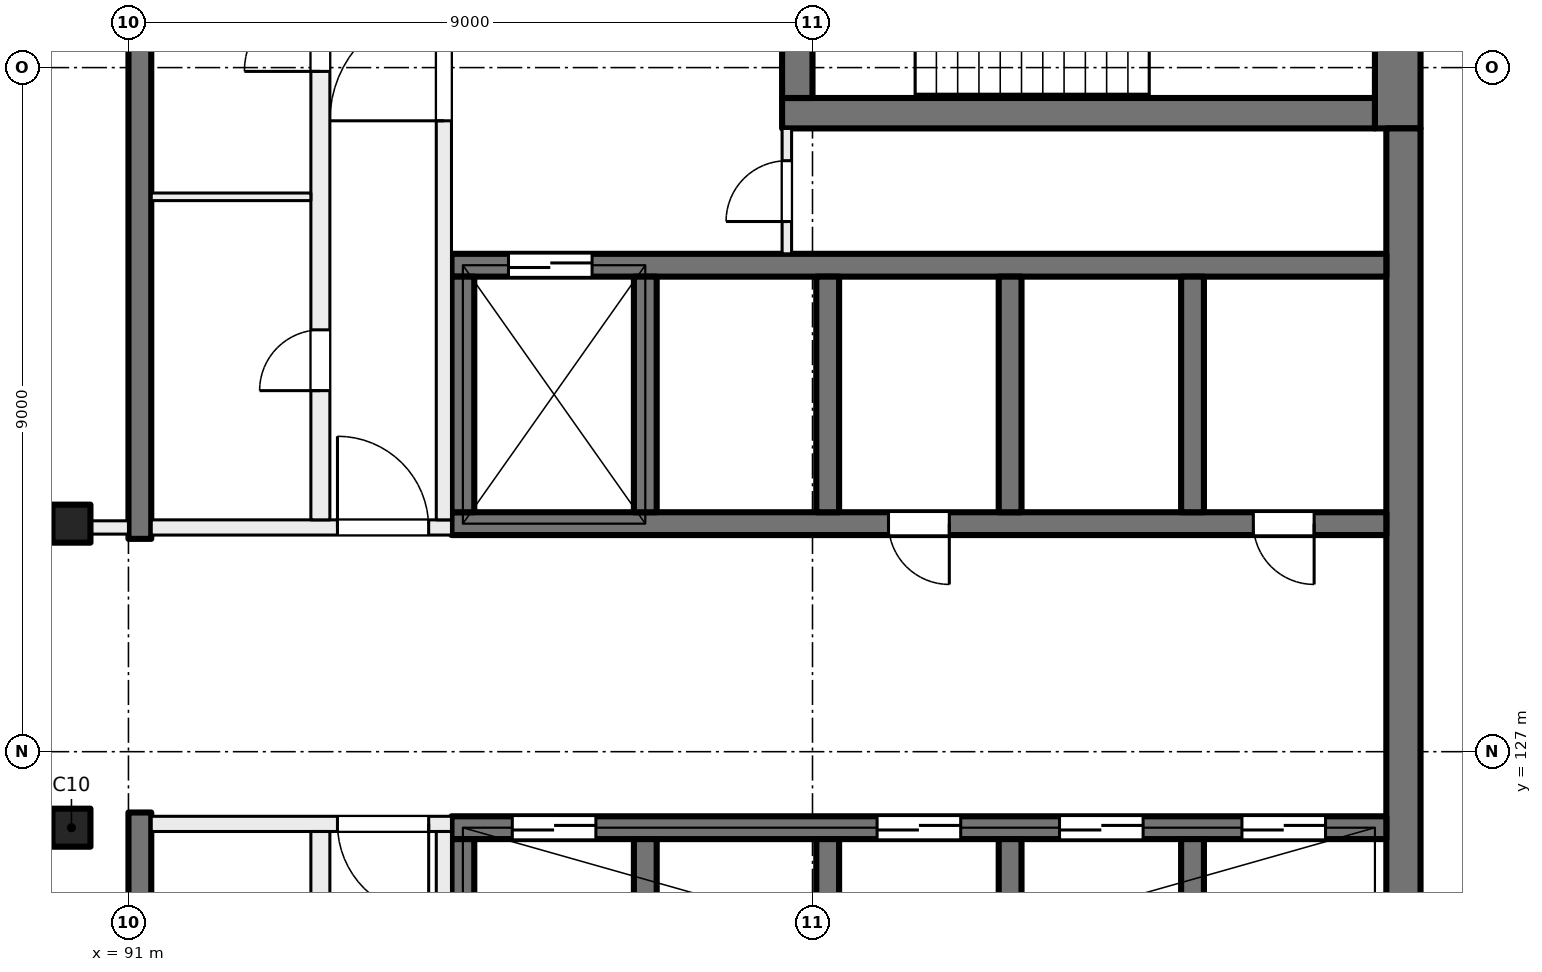
"""IFC4 building model, lengths in metres.
Left out: names, types, materials, properties, quantities, classifications, styles, units other than length and angle.
Written with IfcOpenShell. Run it as: python <this file> out.ifc"""

import sys

from ifc_helpers import new_model, si_unit, direction, frame, frame_2d, origin, origin_2d, place, context, subcontext, project, spatial, rectangle, extrude, element, fill, save


model = new_model("IFC4")
c1 = context("Model", 3, precision=1e-05, world=origin(), true_north=direction((0.0, 1.0)))
c2 = subcontext(c1, "Body", "Model", "MODEL_VIEW")
j1 = project(units=[si_unit("LENGTHUNIT", "METRE"), si_unit("PLANEANGLEUNIT", "RADIAN")], contexts=[c1])
p1 = place(None, origin())
s1 = spatial("IfcSite", under=j1, at=p1, CompositionType="ELEMENT")
p2 = place(p1, origin())
s2 = spatial("IfcBuilding", under=s1, at=p2, CompositionType="ELEMENT")
p3 = place(p2, frame((0.0, 0.0, 265.5)))
s3 = spatial("IfcBuildingStorey", under=s2, at=p3, CompositionType="ELEMENT", Elevation=265.5)
for number, where, z_axis, x_axis in (
    (1, (90.25, 130.0, 0.0), (0.0, 0.0, 1.0), (1.0, 0.0, 0.0)),
    (2, (90.25, 126.0, 0.0), (0.0, 0.0, 1.0), (1.0, 0.0, 0.0)),
):
    element("IfcColumn", number, at=place(p3, frame(where, z_axis=z_axis, x_axis=x_axis)), inside=s3, PredefinedType="COLUMN", context=c2, shape_type="SweptSolid", body=[
        extrude(rectangle(XDim=0.5, YDim=0.5, at=origin_2d()), origin(), (0.0, 0.0, 1.0), 4.0),
    ])
p4 = place(p3, frame((107.7, 139.0, 0.0), z_axis=(0.0, 0.0, 1.0), x_axis=(0.0, -1.0, 0.0)))
e3 = element("IfcWall", 3, at=p4, inside=s3, PredefinedType="SHEAR", context=c2, shape_type="SweptSolid", body=[
    extrude(rectangle(XDim=3.8, YDim=0.6, at=frame_2d((1.9, 0.0))), origin(), (0.0, 0.0, 1.0), 4.0),
])
p5 = place(p3, frame((107.775, 135.2, 0.0), z_axis=(0.0, 0.0, 1.0), x_axis=(0.0, -1.0, 0.0)))
e4 = element("IfcWall", 4, at=p5, inside=s3, PredefinedType="SHEAR", context=c2, shape_type="SweptSolid", body=[
    extrude(rectangle(XDim=14.4, YDim=0.45, at=frame_2d((7.2, 0.0))), origin(), (0.0, 0.0, 1.0), 4.0),
])
p6 = place(p3, frame((107.4, 135.4, 0.0), z_axis=(0.0, 0.0, 1.0), x_axis=(-1.0, 0.0, 0.0)))
e5 = element("IfcWall", 5, at=p6, inside=s3, PredefinedType="SHEAR", context=c2, shape_type="SweptSolid", body=[
    extrude(rectangle(XDim=7.8, YDim=0.4, at=frame_2d((3.9, 0.0))), origin(), (0.0, 0.0, 1.0), 4.0),
])
p7 = place(p3, frame((99.8, 138.4, 0.0), z_axis=(0.0, 0.0, 1.0), x_axis=(0.0, -1.0, 0.0)))
e6 = element("IfcWall", 6, at=p7, inside=s3, PredefinedType="SHEAR", context=c2, shape_type="SweptSolid", body=[
    extrude(rectangle(XDim=2.8, YDim=0.4, at=frame_2d((1.4, 0.0))), origin(), (0.0, 0.0, 1.0), 4.0),
])
p8 = place(p7, frame((0.825, 0.0, 0.0)))
e7 = element("IfcOpeningElement", 7, at=p8, cuts=e6, PredefinedType="OPENING", context=c2, shape_type="SweptSolid", body=[
    extrude(rectangle(XDim=1.0, YDim=2.1, at=frame_2d((0.5, 1.05))), frame((0.0, 0.21, 0.0), z_axis=(0.0, -1.0, 0.0), x_axis=(1.0, 0.0, 0.0)), (0.0, 0.0, 1.0), 0.42),
])
p9 = place(p3, frame((107.55, 130.0, 0.0), z_axis=(0.0, 0.0, 1.0), x_axis=(-1.0, 0.0, 0.0)))
e8 = element("IfcWall", 8, at=p9, inside=s3, PredefinedType="SHEAR", context=c2, shape_type="SweptSolid", body=[
    extrude(rectangle(XDim=12.3, YDim=0.3, at=frame_2d((6.15, 0.0))), origin(), (0.0, 0.0, 1.0), 4.0),
])
p10 = place(p9, frame((0.95, 0.0, 0.0)))
e9 = element("IfcOpeningElement", 9, at=p10, cuts=e8, PredefinedType="OPENING", context=c2, shape_type="SweptSolid", body=[
    extrude(rectangle(XDim=0.8, YDim=2.1, at=frame_2d((0.4, 1.05))), frame((0.0, 0.16, 0.0), z_axis=(0.0, -1.0, 0.0), x_axis=(1.0, 0.0, 0.0)), (0.0, 0.0, 1.0), 0.32),
])
p11 = place(p9, frame((5.75, 0.0, 0.0)))
e10 = element("IfcOpeningElement", 10, at=p11, cuts=e8, PredefinedType="OPENING", context=c2, shape_type="SweptSolid", body=[
    extrude(rectangle(XDim=0.8, YDim=2.1, at=frame_2d((0.4, 1.05))), frame((0.0, 0.16, 0.0), z_axis=(0.0, -1.0, 0.0), x_axis=(1.0, 0.0, 0.0)), (0.0, 0.0, 1.0), 0.32),
])
p12 = place(p3, frame((107.55, 133.4, 0.0), z_axis=(0.0, 0.0, 1.0), x_axis=(-1.0, 0.0, 0.0)))
e11 = element("IfcWall", 11, at=p12, inside=s3, PredefinedType="SHEAR", context=c2, shape_type="SweptSolid", body=[
    extrude(rectangle(XDim=12.3, YDim=0.3, at=frame_2d((6.15, 0.0))), origin(), (0.0, 0.0, 1.0), 4.0),
])
p13 = place(p12, frame((10.45, 0.0, 0.0)))
e12 = element("IfcOpeningElement", 12, at=p13, cuts=e11, PredefinedType="OPENING", context=c2, shape_type="SweptSolid", body=[
    extrude(rectangle(XDim=1.1, YDim=2.1, at=frame_2d((0.55, 1.05))), frame((0.0, 0.16, 0.0), z_axis=(0.0, -1.0, 0.0), x_axis=(1.0, 0.0, 0.0)), (0.0, 0.0, 1.0), 0.32),
])
for number, where, z_axis, x_axis in (
    (13, (105.0, 133.25, 0.0), (0.0, 0.0, 1.0), (0.0, -1.0, 0.0)),
    (14, (102.6, 133.25, 0.0), (0.0, 0.0, 1.0), (0.0, -1.0, 0.0)),
    (15, (100.2, 133.25, 0.0), (0.0, 0.0, 1.0), (0.0, -1.0, 0.0)),
    (16, (97.8, 133.25, 0.0), (0.0, 0.0, 1.0), (0.0, -1.0, 0.0)),
    (17, (95.4, 133.25, 0.0), (0.0, 0.0, 1.0), (0.0, -1.0, 0.0)),
):
    element("IfcWall", number, at=place(p3, frame(where, z_axis=z_axis, x_axis=x_axis)), inside=s3, PredefinedType="SHEAR", context=c2, shape_type="SweptSolid", body=[
        extrude(rectangle(XDim=3.1, YDim=0.3, at=frame_2d((1.55, 0.0))), origin(), (0.0, 0.0, 1.0), 4.0),
    ])
p14 = place(p3, frame((107.55, 126.0, 0.0), z_axis=(0.0, 0.0, 1.0), x_axis=(-1.0, 0.0, 0.0)))
e18 = element("IfcWall", 18, at=p14, inside=s3, PredefinedType="SHEAR", context=c2, shape_type="SweptSolid", body=[
    extrude(rectangle(XDim=12.3, YDim=0.3, at=frame_2d((6.15, 0.0))), origin(), (0.0, 0.0, 1.0), 4.0),
])
p15 = place(p14, frame((0.8, 0.0, 0.0)))
e19 = element("IfcOpeningElement", 19, at=p15, cuts=e18, PredefinedType="OPENING", context=c2, shape_type="SweptSolid", body=[
    extrude(rectangle(XDim=1.1, YDim=2.1, at=frame_2d((0.55, 1.05))), frame((0.0, 0.16, 0.0), z_axis=(0.0, -1.0, 0.0), x_axis=(1.0, 0.0, 0.0)), (0.0, 0.0, 1.0), 0.32),
])
p16 = place(p14, frame((3.2, 0.0, 0.0)))
e20 = element("IfcOpeningElement", 20, at=p16, cuts=e18, PredefinedType="OPENING", context=c2, shape_type="SweptSolid", body=[
    extrude(rectangle(XDim=1.1, YDim=2.1, at=frame_2d((0.55, 1.05))), frame((0.0, 0.16, 0.0), z_axis=(0.0, -1.0, 0.0), x_axis=(1.0, 0.0, 0.0)), (0.0, 0.0, 1.0), 0.32),
])
p17 = place(p14, frame((5.6, 0.0, 0.0)))
e21 = element("IfcOpeningElement", 21, at=p17, cuts=e18, PredefinedType="OPENING", context=c2, shape_type="SweptSolid", body=[
    extrude(rectangle(XDim=1.1, YDim=2.1, at=frame_2d((0.55, 1.05))), frame((0.0, 0.16, 0.0), z_axis=(0.0, -1.0, 0.0), x_axis=(1.0, 0.0, 0.0)), (0.0, 0.0, 1.0), 0.32),
])
p18 = place(p14, frame((10.4, 0.0, 0.0)))
e22 = element("IfcOpeningElement", 22, at=p18, cuts=e18, PredefinedType="OPENING", context=c2, shape_type="SweptSolid", body=[
    extrude(rectangle(XDim=1.1, YDim=2.1, at=frame_2d((0.55, 1.05))), frame((0.0, 0.16, 0.0), z_axis=(0.0, -1.0, 0.0), x_axis=(1.0, 0.0, 0.0)), (0.0, 0.0, 1.0), 0.32),
])
for number, where, z_axis, x_axis in (
    (23, (105.0, 125.85, 0.0), (0.0, 0.0, 1.0), (0.0, -1.0, 0.0)),
    (24, (102.6, 125.85, 0.0), (0.0, 0.0, 1.0), (0.0, -1.0, 0.0)),
    (25, (100.2, 125.85, 0.0), (0.0, 0.0, 1.0), (0.0, -1.0, 0.0)),
    (26, (97.8, 125.85, 0.0), (0.0, 0.0, 1.0), (0.0, -1.0, 0.0)),
    (27, (95.4, 125.85, 0.0), (0.0, 0.0, 1.0), (0.0, -1.0, 0.0)),
):
    element("IfcWall", number, at=place(p3, frame(where, z_axis=z_axis, x_axis=x_axis)), inside=s3, PredefinedType="SHEAR", context=c2, shape_type="SweptSolid", body=[
        extrude(rectangle(XDim=3.1, YDim=0.3, at=frame_2d((1.55, 0.0))), origin(), (0.0, 0.0, 1.0), 4.0),
    ])
for number, where, z_axis, x_axis in (
    (28, (91.15, 138.55, 0.0), (0.0, 0.0, 1.0), (0.0, -1.0, 0.0)),
    (29, (91.15, 126.2, 0.0), (0.0, 0.0, 1.0), (0.0, -1.0, 0.0)),
):
    element("IfcWall", number, at=place(p3, frame(where, z_axis=z_axis, x_axis=x_axis)), inside=s3, PredefinedType="SHEAR", context=c2, shape_type="SweptSolid", body=[
        extrude(rectangle(XDim=8.75, YDim=0.3, at=frame_2d((4.375, 0.0))), origin(), (0.0, 0.0, 1.0), 4.0),
    ])
p19 = place(p3, frame((95.25, 126.05, 0.0), z_axis=(0.0, 0.0, 1.0), x_axis=(-1.0, 0.0, 0.0)))
e30 = element("IfcWall", 30, at=p19, inside=s3, PredefinedType="PARTITIONING", context=c2, shape_type="SweptSolid", body=[
    extrude(rectangle(XDim=3.95, YDim=0.2, at=frame_2d((1.975, 0.0))), origin(), (0.0, 0.0, 1.0), 3.625),
])
p20 = place(p19, frame((0.3, 0.0, 0.0)))
e31 = element("IfcOpeningElement", 31, at=p20, cuts=e30, PredefinedType="OPENING", context=c2, shape_type="SweptSolid", body=[
    extrude(rectangle(XDim=1.2, YDim=2.1, at=frame_2d((0.6, 1.05))), frame((0.0, 0.11, 0.0), z_axis=(0.0, -1.0, 0.0), x_axis=(1.0, 0.0, 0.0)), (0.0, 0.0, 1.0), 0.22),
])
p21 = place(p3, frame((95.15, 117.45, 0.0), z_axis=(0.0, 0.0, 1.0), x_axis=(0.0, 1.0, 0.0)))
e32 = element("IfcWall", 32, at=p21, inside=s3, PredefinedType="PARTITIONING", context=c2, shape_type="SweptSolid", body=[
    extrude(rectangle(XDim=8.5, YDim=0.2, at=frame_2d((4.25, 0.0))), origin(), (0.0, 0.0, 1.0), 3.625),
])
p22 = place(p21, frame((1.75, 0.0, 0.0)))
e33 = element("IfcOpeningElement", 33, at=p22, cuts=e32, PredefinedType="OPENING", context=c2, shape_type="SweptSolid", body=[
    extrude(rectangle(XDim=1.5, YDim=2.1, at=frame_2d((0.75, 1.05))), frame((0.0, 0.11, 0.0), z_axis=(0.0, -1.0, 0.0), x_axis=(1.0, 0.0, 0.0)), (0.0, 0.0, 1.0), 0.22),
])
p23 = place(p3, frame((93.525, 117.45, 0.0), z_axis=(0.0, 0.0, 1.0), x_axis=(0.0, 1.0, 0.0)))
e34 = element("IfcWall", 34, at=p23, inside=s3, PredefinedType="PARTITIONING", context=c2, shape_type="SweptSolid", body=[
    extrude(rectangle(XDim=8.5, YDim=0.25, at=frame_2d((4.25, 0.0))), origin(), (0.0, 0.0, 1.0), 3.625),
])
p24 = place(p23, frame((5.19, 0.0, 0.0)))
e35 = element("IfcOpeningElement", 35, at=p24, cuts=e34, PredefinedType="OPENING", context=c2, shape_type="SweptSolid", body=[
    extrude(rectangle(XDim=1.0, YDim=2.1, at=frame_2d((0.5, 1.05))), frame((0.0, 0.135, 0.0), z_axis=(0.0, -1.0, 0.0), x_axis=(1.0, 0.0, 0.0)), (0.0, 0.0, 1.0), 0.27),
])
p25 = place(p23, frame((0.99, 0.0, 0.0)))
e36 = element("IfcOpeningElement", 36, at=p25, cuts=e34, PredefinedType="OPENING", context=c2, shape_type="SweptSolid", body=[
    extrude(rectangle(XDim=0.8, YDim=2.1, at=frame_2d((0.4, 1.05))), frame((0.0, 0.135, 0.0), z_axis=(0.0, -1.0, 0.0), x_axis=(1.0, 0.0, 0.0)), (0.0, 0.0, 1.0), 0.27),
])
p26 = place(p3, frame((91.3, 129.95, 0.0), z_axis=(0.0, 0.0, 1.0), x_axis=(1.0, 0.0, 0.0)))
e37 = element("IfcWall", 37, at=p26, inside=s3, PredefinedType="PARTITIONING", context=c2, shape_type="SweptSolid", body=[
    extrude(rectangle(XDim=3.95, YDim=0.2, at=frame_2d((1.975, 0.0))), origin(), (0.0, 0.0, 1.0), 3.625),
])
p27 = place(p26, frame((2.45, 0.0, 0.0)))
e38 = element("IfcOpeningElement", 38, at=p27, cuts=e37, PredefinedType="OPENING", context=c2, shape_type="SweptSolid", body=[
    extrude(rectangle(XDim=1.2, YDim=2.1, at=frame_2d((0.6, 1.05))), frame((0.0, 0.11, 0.0), z_axis=(0.0, -1.0, 0.0), x_axis=(1.0, 0.0, 0.0)), (0.0, 0.0, 1.0), 0.22),
])
p28 = place(p3, frame((95.15, 130.05, 0.0), z_axis=(0.0, 0.0, 1.0), x_axis=(0.0, 1.0, 0.0)))
e39 = element("IfcWall", 39, at=p28, inside=s3, PredefinedType="PARTITIONING", context=c2, shape_type="SweptSolid", body=[
    extrude(rectangle(XDim=8.5, YDim=0.2, at=frame_2d((4.25, 0.0))), origin(), (0.0, 0.0, 1.0), 3.625),
])
p29 = place(p28, frame((5.25, 0.0, 0.0)))
e40 = element("IfcOpeningElement", 40, at=p29, cuts=e39, PredefinedType="OPENING", context=c2, shape_type="SweptSolid", body=[
    extrude(rectangle(XDim=1.5, YDim=2.1, at=frame_2d((0.75, 1.05))), frame((0.0, 0.11, 0.0), z_axis=(0.0, -1.0, 0.0), x_axis=(1.0, 0.0, 0.0)), (0.0, 0.0, 1.0), 0.22),
])
p30 = place(p3, frame((93.525, 130.05, 0.0), z_axis=(0.0, 0.0, 1.0), x_axis=(0.0, 1.0, 0.0)))
e41 = element("IfcWall", 41, at=p30, inside=s3, PredefinedType="PARTITIONING", context=c2, shape_type="SweptSolid", body=[
    extrude(rectangle(XDim=8.5, YDim=0.25, at=frame_2d((4.25, 0.0))), origin(), (0.0, 0.0, 1.0), 3.625),
])
p31 = place(p30, frame((1.7, 0.0, 0.0)))
e42 = element("IfcOpeningElement", 42, at=p31, cuts=e41, PredefinedType="OPENING", context=c2, shape_type="SweptSolid", body=[
    extrude(rectangle(XDim=0.8, YDim=2.1, at=frame_2d((0.4, 1.05))), frame((0.0, 0.135, 0.0), z_axis=(0.0, -1.0, 0.0), x_axis=(1.0, 0.0, 0.0)), (0.0, 0.0, 1.0), 0.27),
])
p32 = place(p30, frame((5.9, 0.0, 0.0)))
e43 = element("IfcOpeningElement", 43, at=p32, cuts=e41, PredefinedType="OPENING", context=c2, shape_type="SweptSolid", body=[
    extrude(rectangle(XDim=1.0, YDim=2.1, at=frame_2d((0.5, 1.05))), frame((0.0, 0.135, 0.0), z_axis=(0.0, -1.0, 0.0), x_axis=(1.0, 0.0, 0.0)), (0.0, 0.0, 1.0), 0.27),
])
p33 = place(p3, frame((99.663, 133.55, 0.0), z_axis=(0.0, 0.0, 1.0), x_axis=(0.0, 1.0, 0.0)))
e44 = element("IfcWall", 44, at=p33, inside=s3, PredefinedType="PARTITIONING", context=c2, shape_type="SweptSolid", body=[
    extrude(rectangle(XDim=1.65, YDim=0.125, at=frame_2d((0.825, 0.0))), origin(), (0.0, 0.0, 1.0), 3.625),
])
p34 = place(p33, frame((0.425, 0.0, 0.0)))
e45 = element("IfcOpeningElement", 45, at=p34, cuts=e44, PredefinedType="OPENING", context=c2, shape_type="SweptSolid", body=[
    extrude(rectangle(XDim=0.8, YDim=2.1, at=frame_2d((0.4, 1.05))), frame((0.0, 0.073, 0.0), z_axis=(0.0, -1.0, 0.0), x_axis=(1.0, 0.0, 0.0)), (0.0, 0.0, 1.0), 0.145),
])
p35 = place(p3, frame((91.3, 134.3, 0.0), z_axis=(0.0, 0.0, 1.0), x_axis=(1.0, 0.0, 0.0)))
e46 = element("IfcWall", 46, at=p35, inside=s3, PredefinedType="PARTITIONING", context=c2, shape_type="SweptSolid", body=[
    extrude(rectangle(XDim=2.1, YDim=0.1, at=frame_2d((1.05, 0.0))), origin(), (0.0, 0.0, 1.0), 3.625),
])
p36 = place(p3, frame((85.838, 129.95, 0.0), z_axis=(0.0, 0.0, 1.0), x_axis=(1.0, 0.0, 0.0)))
e47 = element("IfcWall", 47, at=p36, inside=s3, PredefinedType="PARTITIONING", context=c2, shape_type="SweptSolid", body=[
    extrude(rectangle(XDim=5.162, YDim=0.175, at=frame_2d((2.581, 0.0))), origin(), (0.0, 0.0, 1.0), 3.625),
])
p37 = place(p36, frame((1.971, 0.0, 0.0)))
e48 = element("IfcOpeningElement", 48, at=p37, cuts=e47, PredefinedType="OPENING", context=c2, shape_type="SweptSolid", body=[
    extrude(rectangle(XDim=1.2, YDim=2.1, at=frame_2d((0.6, 1.05))), frame((0.0, 0.097, 0.0), z_axis=(0.0, -1.0, 0.0), x_axis=(1.0, 0.0, 0.0)), (0.0, 0.0, 1.0), 0.195),
])
p38 = place(p15, origin())
e49 = element("IfcDoor", 49, at=p38, inside=s3, OperationType="DOUBLE_DOOR_SLIDING", PredefinedType="DOOR", context=c2, shape_type="SweptSolid", body=[
    extrude(rectangle(XDim=1.1, YDim=2.1, at=frame_2d((0.55, 1.05))), frame((0.0, 0.025, 0.0), z_axis=(0.0, -1.0, 0.0), x_axis=(1.0, 0.0, 0.0)), (0.0, 0.0, 1.0), 0.05),
])
fill(e19, e49)
p39 = place(p16, origin())
e50 = element("IfcDoor", 50, at=p39, inside=s3, OperationType="DOUBLE_DOOR_SLIDING", PredefinedType="DOOR", context=c2, shape_type="SweptSolid", body=[
    extrude(rectangle(XDim=1.1, YDim=2.1, at=frame_2d((0.55, 1.05))), frame((0.0, 0.025, 0.0), z_axis=(0.0, -1.0, 0.0), x_axis=(1.0, 0.0, 0.0)), (0.0, 0.0, 1.0), 0.05),
])
fill(e20, e50)
p40 = place(p17, origin())
e51 = element("IfcDoor", 51, at=p40, inside=s3, OperationType="DOUBLE_DOOR_SLIDING", PredefinedType="DOOR", context=c2, shape_type="SweptSolid", body=[
    extrude(rectangle(XDim=1.1, YDim=2.1, at=frame_2d((0.55, 1.05))), frame((0.0, 0.025, 0.0), z_axis=(0.0, -1.0, 0.0), x_axis=(1.0, 0.0, 0.0)), (0.0, 0.0, 1.0), 0.05),
])
fill(e21, e51)
p41 = place(p18, origin())
e52 = element("IfcDoor", 52, at=p41, inside=s3, OperationType="DOUBLE_DOOR_SLIDING", PredefinedType="DOOR", context=c2, shape_type="SweptSolid", body=[
    extrude(rectangle(XDim=1.1, YDim=2.1, at=frame_2d((0.55, 1.05))), frame((0.0, 0.025, 0.0), z_axis=(0.0, -1.0, 0.0), x_axis=(1.0, 0.0, 0.0)), (0.0, 0.0, 1.0), 0.05),
])
fill(e22, e52)
p42 = place(p10, origin())
e53 = element("IfcDoor", 53, at=p42, inside=s3, OperationType="SINGLE_SWING_LEFT", PredefinedType="DOOR", context=c2, shape_type="SweptSolid", body=[
    extrude(rectangle(XDim=0.8, YDim=2.1, at=frame_2d((0.4, 1.05))), frame((0.0, 0.025, 0.0), z_axis=(0.0, -1.0, 0.0), x_axis=(1.0, 0.0, 0.0)), (0.0, 0.0, 1.0), 0.05),
])
fill(e9, e53)
p43 = place(p11, origin())
e54 = element("IfcDoor", 54, at=p43, inside=s3, OperationType="SINGLE_SWING_RIGHT", PredefinedType="DOOR", context=c2, shape_type="SweptSolid", body=[
    extrude(rectangle(XDim=0.8, YDim=2.1, at=frame_2d((0.4, 1.05))), frame((0.0, 0.025, 0.0), z_axis=(0.0, -1.0, 0.0), x_axis=(1.0, 0.0, 0.0)), (0.0, 0.0, 1.0), 0.05),
])
fill(e10, e54)
p44 = place(p20, origin())
e55 = element("IfcDoor", 55, at=p44, inside=s3, OperationType="DOUBLE_DOOR_SINGLE_SWING", PredefinedType="DOOR", context=c2, shape_type="SweptSolid", body=[
    extrude(rectangle(XDim=1.2, YDim=2.1, at=frame_2d((0.6, 1.05))), frame((0.0, 0.025, 0.0), z_axis=(0.0, -1.0, 0.0), x_axis=(1.0, 0.0, 0.0)), (0.0, 0.0, 1.0), 0.05),
])
fill(e31, e55)
p45 = place(p27, origin())
e56 = element("IfcDoor", 56, at=p45, inside=s3, OperationType="DOUBLE_DOOR_SINGLE_SWING", PredefinedType="DOOR", context=c2, shape_type="SweptSolid", body=[
    extrude(rectangle(XDim=1.2, YDim=2.1, at=frame_2d((0.6, 1.05))), frame((0.0, 0.025, 0.0), z_axis=(0.0, -1.0, 0.0), x_axis=(1.0, 0.0, 0.0)), (0.0, 0.0, 1.0), 0.05),
])
fill(e38, e56)
p46 = place(p29, origin())
e57 = element("IfcDoor", 57, at=p46, inside=s3, OperationType="DOUBLE_DOOR_SINGLE_SWING", PredefinedType="DOOR", context=c2, shape_type="SweptSolid", body=[
    extrude(rectangle(XDim=1.5, YDim=2.1, at=frame_2d((0.75, 1.05))), frame((0.0, 0.025, 0.0), z_axis=(0.0, -1.0, 0.0), x_axis=(1.0, 0.0, 0.0)), (0.0, 0.0, 1.0), 0.05),
])
fill(e40, e57)
p47 = place(p34, origin())
e58 = element("IfcDoor", 58, at=p47, inside=s3, OperationType="SINGLE_SWING_LEFT", PredefinedType="DOOR", context=c2, shape_type="SweptSolid", body=[
    extrude(rectangle(XDim=0.8, YDim=2.1, at=frame_2d((0.4, 1.05))), frame((0.0, 0.025, 0.0), z_axis=(0.0, -1.0, 0.0), x_axis=(1.0, 0.0, 0.0)), (0.0, 0.0, 1.0), 0.05),
])
fill(e45, e58)
p48 = place(p31, origin())
e59 = element("IfcDoor", 59, at=p48, inside=s3, OperationType="SINGLE_SWING_RIGHT", PredefinedType="DOOR", context=c2, shape_type="SweptSolid", body=[
    extrude(rectangle(XDim=0.8, YDim=2.1, at=frame_2d((0.4, 1.05))), frame((0.0, 0.025, 0.0), z_axis=(0.0, -1.0, 0.0), x_axis=(1.0, 0.0, 0.0)), (0.0, 0.0, 1.0), 0.05),
])
fill(e42, e59)
p49 = place(p32, origin())
e60 = element("IfcDoor", 60, at=p49, inside=s3, OperationType="SINGLE_SWING_LEFT", PredefinedType="DOOR", context=c2, shape_type="SweptSolid", body=[
    extrude(rectangle(XDim=1.0, YDim=2.1, at=frame_2d((0.5, 1.05))), frame((0.0, 0.025, 0.0), z_axis=(0.0, -1.0, 0.0), x_axis=(1.0, 0.0, 0.0)), (0.0, 0.0, 1.0), 0.05),
])
fill(e43, e60)
p50 = place(p13, origin())
e61 = element("IfcDoor", 61, at=p50, inside=s3, OperationType="DOUBLE_DOOR_SLIDING", PredefinedType="DOOR", context=c2, shape_type="SweptSolid", body=[
    extrude(rectangle(XDim=1.1, YDim=2.1, at=frame_2d((0.55, 1.05))), frame((0.0, 0.025, 0.0), z_axis=(0.0, -1.0, 0.0), x_axis=(1.0, 0.0, 0.0)), (0.0, 0.0, 1.0), 0.05),
])
fill(e12, e61)
save(model, sys.argv[1])
